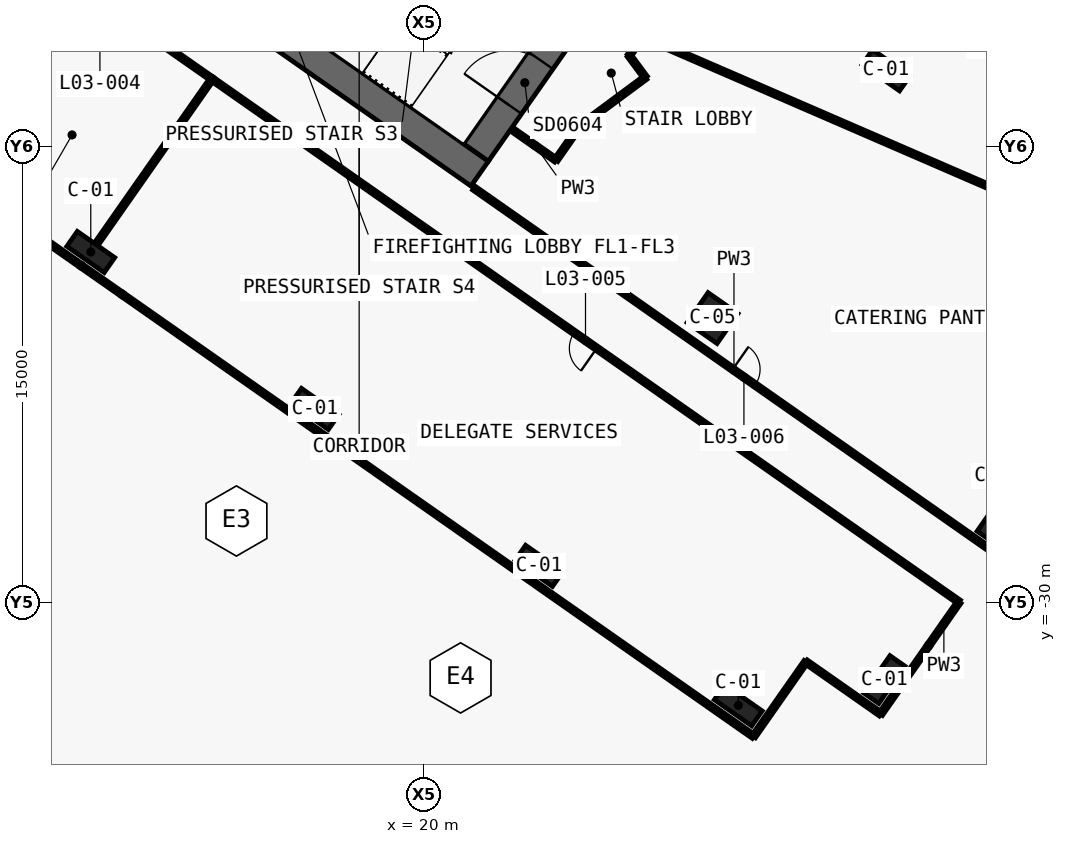
"""IFC4 building model, lengths in metres.
Left out: names, types, materials, properties, quantities, classifications, styles, units other than length and angle.
Written with IfcOpenShell. Run it as: python <this file> out.ifc"""

import sys

from ifc_helpers import new_model, si_unit, direction, frame, frame_2d, origin, origin_2d, place, context, subcontext, project, spatial, polyline, rectangle, outline, extrude, element, fill, save


model = new_model("IFC4")
c1 = context("Model", 3, precision=1e-05, world=origin(), true_north=direction((0.0, 1.0)))
c2 = subcontext(c1, "Body", "Model", "MODEL_VIEW")
j1 = project(units=[si_unit("LENGTHUNIT", "METRE"), si_unit("PLANEANGLEUNIT", "RADIAN")], contexts=[c1])
p1 = place(None, origin())
s1 = spatial("IfcSite", under=j1, at=p1, CompositionType="ELEMENT")
p2 = place(p1, origin())
s2 = spatial("IfcBuilding", under=s1, at=p2, CompositionType="ELEMENT")
p3 = place(p2, frame((0.0, 0.0, 26.0)))
s3 = spatial("IfcBuildingStorey", under=s2, at=p3, CompositionType="ELEMENT", Elevation=26.0)
p4 = place(p3, frame((-0.037, -0.585, 0.0), z_axis=(0.0, 0.0, 1.0), x_axis=(0.819157152511, -0.573569140985, 0.0)))
e1 = element("IfcWall", 1, at=p4, inside=s3, PredefinedType="SHEAR", context=c2, shape_type="SweptSolid", body=[
    extrude(outline(polyline([(26.695, 0.5), (0.0, 0.5), (0.7, -0.5), (26.695, -0.5), (26.695, 0.5)])), origin(), (0.0, 0.0, 1.0), 6.0),
])
p5 = place(p4, frame((1.245, 0.0, 0.0)))
e2 = element("IfcOpeningElement", 2, at=p5, cuts=e1, PredefinedType="OPENING", context=c2, shape_type="SweptSolid", body=[
    extrude(rectangle(XDim=1.5, YDim=2.1, at=frame_2d((0.75, 1.05))), frame((0.0, 0.51, 0.0), z_axis=(0.0, -1.0, 0.0), x_axis=(1.0, 0.0, 0.0)), (0.0, 0.0, 1.0), 1.02),
])
p6 = place(p4, frame((12.445, 0.0, 0.0)))
e3 = element("IfcOpeningElement", 3, at=p6, cuts=e1, PredefinedType="OPENING", context=c2, shape_type="SweptSolid", body=[
    extrude(rectangle(XDim=1.5, YDim=2.1, at=frame_2d((0.75, 1.05))), frame((0.0, 0.51, 0.0), z_axis=(0.0, -1.0, 0.0), x_axis=(1.0, 0.0, 0.0)), (0.0, 0.0, 1.0), 1.02),
])
p7 = place(p3, frame((21.708, -15.2, 0.0), z_axis=(0.0, 0.0, 1.0), x_axis=(0.573576324356, 0.819152122709, 0.0)))
e4 = element("IfcWall", 4, at=p7, inside=s3, PredefinedType="SHEAR", context=c2, shape_type="SweptSolid", body=[
    extrude(outline(polyline([(9.2, 0.5), (0.0, 0.5), (0.0, -0.5), (9.2, -0.5), (9.2, 0.5)])), origin(), (0.0, 0.0, 1.0), 6.0),
])
p8 = place(p7, frame((6.1, 0.0, 0.0)))
e5 = element("IfcOpeningElement", 5, at=p8, cuts=e4, PredefinedType="OPENING", context=c2, shape_type="SweptSolid", body=[
    extrude(rectangle(XDim=1.8, YDim=2.1, at=frame_2d((0.9, 1.05))), frame((0.0, 0.51, 0.0), z_axis=(0.0, -1.0, 0.0), x_axis=(1.0, 0.0, 0.0)), (0.0, 0.0, 1.0), 1.02),
])
p9 = place(p7, frame((1.9, 0.0, 0.0)))
e6 = element("IfcOpeningElement", 6, at=p9, cuts=e4, PredefinedType="OPENING", context=c2, shape_type="SweptSolid", body=[
    extrude(rectangle(XDim=1.8, YDim=2.1, at=frame_2d((0.9, 1.05))), frame((0.0, 0.51, 0.0), z_axis=(0.0, -1.0, 0.0), x_axis=(1.0, 0.0, 0.0)), (0.0, 0.0, 1.0), 1.02),
])
for number, where, z_axis, x_axis in (
    (7, (9.038, -18.475, 0.0), (0.0, 0.0, 1.0), (0.819, -0.574, 0.0)),
    (8, (16.41, -23.637, 0.0), (0.0, 0.0, 1.0), (0.819, -0.574, 0.0)),
    (9, (23.782, -28.799, 0.0), (0.0, 0.0, 1.0), (0.819, -0.574, 0.0)),
    (10, (30.336, -33.388, 0.0), (0.0, 0.0, 1.0), (0.819, -0.574, 0.0)),
    (11, (35.197, -12.498, 0.0), (0.0, 0.0, 1.0), (0.819, -0.574, 0.0)),
    (12, (35.14, -32.541, 0.0), (0.0, 0.0, 1.0), (0.574, 0.819, 0.0)),
    (13, (38.869, -27.216, 0.0), (0.0, 0.0, 1.0), (0.574, 0.819, 0.0)),
):
    element("IfcColumn", number, at=place(p3, frame(where, z_axis=z_axis, x_axis=x_axis)), inside=s3, PredefinedType="COLUMN", context=c2, shape_type="SweptSolid", body=[
        extrude(rectangle(XDim=1.5, YDim=0.6, at=origin_2d()), origin(), (0.0, 0.0, 1.0), 6.0),
    ])
p10 = place(p3, frame((29.49, -20.649, 0.0), z_axis=(0.0, 0.0, 1.0), x_axis=(0.819152044289, -0.573576436351, 0.0)))
e14 = element("IfcColumn", 14, at=p10, inside=s3, PredefinedType="COLUMN", context=c2, shape_type="SweptSolid", body=[
    extrude(rectangle(XDim=1.2, YDim=1.2, at=origin_2d()), origin(), (0.0, 0.0, 1.0), 6.0),
])
p11 = place(p3, frame((21.642, -16.375, 0.0), z_axis=(0.0, 0.0, 1.0), x_axis=(0.819148965066, -0.573580833911, 0.0)))
e15 = element("IfcWall", 15, at=p11, inside=s3, PredefinedType="PARTITIONING", context=c2, shape_type="SweptSolid", body=[
    extrude(rectangle(XDim=20.88, YDim=0.15, at=frame_2d((10.44, 0.0))), origin(), (0.0, 0.0, 1.0), 4.18),
])
p12 = place(p11, frame((10.39, 0.0, 0.0)))
e16 = element("IfcOpeningElement", 16, at=p12, cuts=e15, PredefinedType="OPENING", context=c2, shape_type="SweptSolid", body=[
    extrude(rectangle(XDim=0.9, YDim=2.1, at=frame_2d((0.45, 1.05))), frame((0.0, 0.085, 0.0), z_axis=(0.0, -1.0, 0.0), x_axis=(1.0, 0.0, 0.0)), (0.0, 0.0, 1.0), 0.17),
])
p13 = place(p3, frame((13.026, -12.783, 0.0), z_axis=(0.0, 0.0, 1.0), x_axis=(-0.81915291695, 0.57357519006, 0.0)))
e17 = element("IfcWall", 17, at=p13, inside=s3, PredefinedType="PARTITIONING", context=c2, shape_type="SweptSolid", body=[
    extrude(rectangle(XDim=9.002, YDim=0.15, at=frame_2d((4.501, 0.0))), origin(), (0.0, 0.0, 1.0), 4.18),
])
p14 = place(p13, frame((4.051, 0.0, 0.0)))
e18 = element("IfcOpeningElement", 18, at=p14, cuts=e17, PredefinedType="OPENING", context=c2, shape_type="SweptSolid", body=[
    extrude(rectangle(XDim=0.9, YDim=2.1, at=frame_2d((0.45, 1.05))), frame((0.0, 0.085, 0.0), z_axis=(0.0, -1.0, 0.0), x_axis=(1.0, 0.0, 0.0)), (0.0, 0.0, 1.0), 0.17),
])
p15 = place(p3, frame((37.599, -29.989, 0.0), z_axis=(0.0, 0.0, 1.0), x_axis=(-0.819154688631, 0.57357265982, 0.0)))
e19 = element("IfcWall", 19, at=p15, inside=s3, PredefinedType="PARTITIONING", context=c2, shape_type="SweptSolid", body=[
    extrude(rectangle(XDim=30.002, YDim=0.15, at=frame_2d((15.001, 0.0))), origin(), (0.0, 0.0, 1.0), 4.18),
])
p16 = place(p15, frame((14.551, 0.0, 0.0)))
e20 = element("IfcOpeningElement", 20, at=p16, cuts=e19, PredefinedType="OPENING", context=c2, shape_type="SweptSolid", body=[
    extrude(rectangle(XDim=0.9, YDim=2.1, at=frame_2d((0.45, 1.05))), frame((0.0, 0.085, 0.0), z_axis=(0.0, -1.0, 0.0), x_axis=(1.0, 0.0, 0.0)), (0.0, 0.0, 1.0), 0.17),
])
p17 = place(p3, frame((26.746, -12.014, 0.0), z_axis=(0.0, 0.0, 1.0), x_axis=(0.573761975376, 0.819022097146, 0.0)))
e21 = element("IfcWall", 21, at=p17, inside=s3, PredefinedType="PARTITIONING", context=c2, shape_type="SweptSolid", body=[
    extrude(rectangle(XDim=0.765, YDim=0.15, at=frame_2d((0.383, 0.0))), origin(), (0.0, 0.0, 1.0), 5.6),
])
p18 = place(p3, frame((27.185, -11.387, 0.0), z_axis=(0.0, 0.0, 1.0), x_axis=(0.917531384635, -0.397663372979, 0.0)))
e22 = element("IfcWall", 22, at=p18, inside=s3, PredefinedType="PARTITIONING", context=c2, shape_type="SweptSolid", body=[
    extrude(rectangle(XDim=16.536, YDim=0.15, at=frame_2d((8.268, 0.0))), origin(), (0.0, 0.0, 1.0), 4.18),
])
p19 = place(p3, frame((22.961, -14.49, 0.0), z_axis=(0.0, 0.0, 1.0), x_axis=(0.819109000826, -0.573637903879, 0.0)))
e23 = element("IfcWall", 23, at=p19, inside=s3, PredefinedType="PARTITIONING", context=c2, shape_type="SweptSolid", body=[
    extrude(rectangle(XDim=1.68, YDim=0.15, at=frame_2d((0.84, 0.0))), origin(), (0.0, 0.0, 1.0), 5.6),
])
p20 = place(p3, frame((24.337, -15.454, 0.0), z_axis=(0.0, 0.0, 1.0), x_axis=(0.573571252353, 0.819155674139, 0.0)))
e24 = element("IfcWall", 24, at=p20, inside=s3, PredefinedType="PARTITIONING", context=c2, shape_type="SweptSolid", body=[
    extrude(rectangle(XDim=1.354, YDim=0.15, at=frame_2d((0.677, 0.0))), origin(), (0.0, 0.0, 1.0), 5.6),
])
p21 = place(p3, frame((25.114, -14.345, 0.0), z_axis=(0.0, 0.0, 1.0), x_axis=(0.803211070557, 0.595694532571, 0.0)))
e25 = element("IfcWall", 25, at=p21, inside=s3, PredefinedType="PARTITIONING", context=c2, shape_type="SweptSolid", body=[
    extrude(rectangle(XDim=2.7, YDim=0.15, at=frame_2d((1.35, 0.0))), origin(), (0.0, 0.0, 1.0), 5.6),
])
p22 = place(p3, frame((27.282, -12.737, 0.0), z_axis=(0.0, 0.0, 1.0), x_axis=(-0.595869495235, 0.803081281471, 0.0)))
e26 = element("IfcWall", 26, at=p22, inside=s3, PredefinedType="PARTITIONING", context=c2, shape_type="SweptSolid", body=[
    extrude(rectangle(XDim=0.9, YDim=0.15, at=frame_2d((0.45, 0.0))), origin(), (0.0, 0.0, 1.0), 5.6),
])
p23 = place(p3, frame((13.024, -12.782, 0.0), z_axis=(0.0, 0.0, 1.0), x_axis=(-0.573556251799, -0.819166177294, 0.0)))
e27 = element("IfcWall", 27, at=p23, inside=s3, PredefinedType="PARTITIONING", context=c2, shape_type="SweptSolid", body=[
    extrude(rectangle(XDim=6.63, YDim=0.15, at=frame_2d((3.315, 0.0))), origin(), (0.0, 0.0, 1.0), 4.18),
])
p24 = place(p3, frame((8.722, -18.926, 0.0), z_axis=(0.0, 0.0, 1.0), x_axis=(-0.819141427692, 0.573591598124, 0.0)))
e28 = element("IfcWall", 28, at=p24, inside=s3, PredefinedType="PARTITIONING", context=c2, shape_type="SweptSolid", body=[
    extrude(rectangle(XDim=9.0, YDim=0.15, at=frame_2d((4.5, 0.0))), origin(), (0.0, 0.0, 1.0), 5.6),
])
p25 = place(p3, frame((32.56, -31.955, 0.0), z_axis=(0.0, 0.0, 1.0), x_axis=(-0.573560650686, -0.819163097304, 0.0)))
e29 = element("IfcWall", 29, at=p25, inside=s3, PredefinedType="PARTITIONING", context=c2, shape_type="SweptSolid", body=[
    extrude(rectangle(XDim=3.0, YDim=0.15, at=frame_2d((1.5, 0.0))), origin(), (0.0, 0.0, 1.0), 4.38),
])
p26 = place(p3, frame((30.839, -34.412, 0.0), z_axis=(0.0, 0.0, 1.0), x_axis=(-0.819153188106, 0.573574802808, 0.0)))
e30 = element("IfcWall", 30, at=p26, inside=s3, PredefinedType="PARTITIONING", context=c2, shape_type="SweptSolid", body=[
    extrude(rectangle(XDim=25.351, YDim=0.15, at=frame_2d((12.675, 0.0))), origin(), (0.0, 0.0, 1.0), 5.6),
])
p27 = place(p3, frame((36.599, -31.417, 0.0), z_axis=(0.0, 0.0, 1.0), x_axis=(-0.573557416232, -0.819165361991, 0.0)))
e31 = element("IfcWall", 31, at=p27, inside=s3, PredefinedType="PARTITIONING", context=c2, shape_type="SweptSolid", body=[
    extrude(rectangle(XDim=2.757, YDim=0.15, at=frame_2d((1.379, 0.0))), origin(), (0.0, 0.0, 1.0), 5.6),
])
p28 = place(p3, frame((35.018, -33.675, 0.0), z_axis=(0.0, 0.0, 1.0), x_axis=(-0.819163097304, 0.573560650686, 0.0)))
e32 = element("IfcWall", 32, at=p28, inside=s3, PredefinedType="PARTITIONING", context=c2, shape_type="SweptSolid", body=[
    extrude(rectangle(XDim=3.0, YDim=0.15, at=frame_2d((1.5, 0.0))), origin(), (0.0, 0.0, 1.0), 4.38),
])
p29 = place(p3, frame((37.599, -29.989, 0.0), z_axis=(0.0, 0.0, 1.0), x_axis=(-0.573575034625, -0.819153025786, 0.0)))
e33 = element("IfcWall", 33, at=p29, inside=s3, PredefinedType="PARTITIONING", context=c2, shape_type="SweptSolid", body=[
    extrude(rectangle(XDim=1.745, YDim=0.15, at=frame_2d((0.872, 0.0))), origin(), (0.0, 0.0, 1.0), 5.6),
])
p30 = place(p3, frame((10.075, -19.873, 0.0), z_axis=(0.0, 0.0, 1.0), x_axis=(-0.819190252408, 0.573521865634, 0.0)))
e34 = element("IfcWall", 34, at=p30, inside=s3, PredefinedType="PARTITIONING", context=c2, shape_type="SweptSolid", body=[
    extrude(rectangle(XDim=1.652, YDim=0.15, at=frame_2d((0.826, 0.0))), origin(), (0.0, 0.0, 1.0), 4.58),
])
p31 = place(p9, origin())
e35 = element("IfcDoor", 35, at=p31, inside=s3, OperationType="DOUBLE_DOOR_SINGLE_SWING", PredefinedType="DOOR", context=c2, shape_type="SweptSolid", body=[
    extrude(rectangle(XDim=1.8, YDim=2.1, at=frame_2d((0.9, 1.05))), frame((0.0, 0.025, 0.0), z_axis=(0.0, -1.0, 0.0), x_axis=(1.0, 0.0, 0.0)), (0.0, 0.0, 1.0), 0.05),
])
fill(e6, e35)
p32 = place(p16, origin())
e36 = element("IfcDoor", 36, at=p32, inside=s3, OperationType="SINGLE_SWING_LEFT", PredefinedType="DOOR", context=c2, shape_type="SweptSolid", body=[
    extrude(rectangle(XDim=0.9, YDim=2.1, at=frame_2d((0.45, 1.05))), frame((0.0, 0.025, 0.0), z_axis=(0.0, -1.0, 0.0), x_axis=(1.0, 0.0, 0.0)), (0.0, 0.0, 1.0), 0.05),
])
fill(e20, e36)
p33 = place(p12, origin())
e37 = element("IfcDoor", 37, at=p33, inside=s3, OperationType="SINGLE_SWING_RIGHT", PredefinedType="DOOR", context=c2, shape_type="SweptSolid", body=[
    extrude(rectangle(XDim=0.9, YDim=2.1, at=frame_2d((0.45, 1.05))), frame((0.0, 0.025, 0.0), z_axis=(0.0, -1.0, 0.0), x_axis=(1.0, 0.0, 0.0)), (0.0, 0.0, 1.0), 0.05),
])
fill(e16, e37)
save(model, sys.argv[1])
